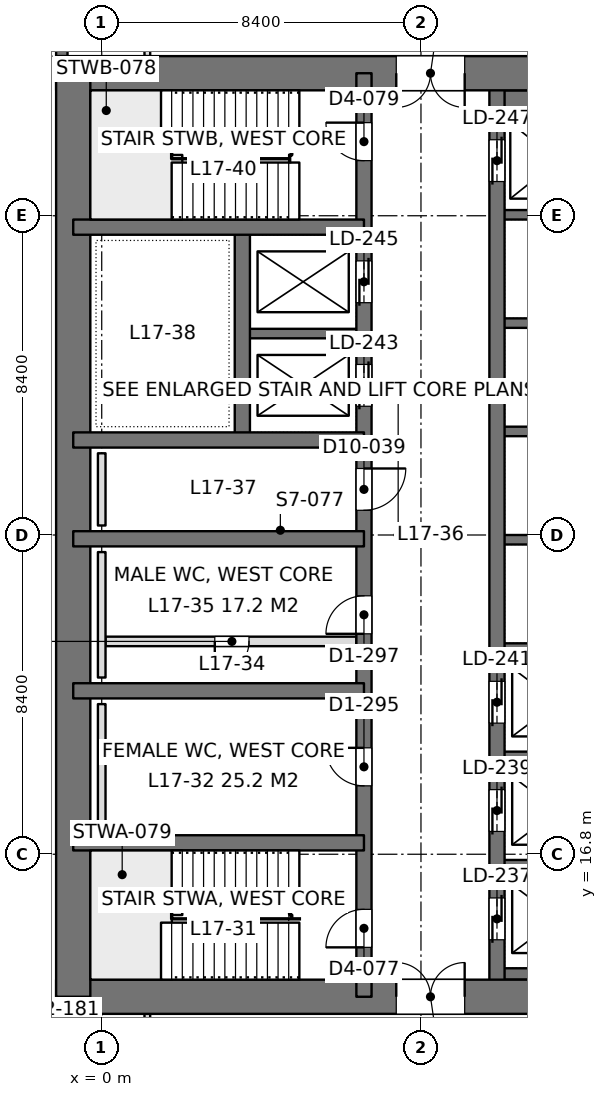
"""IFC4 building model, lengths in metres.
Left out: names, types, materials, properties, quantities, classifications, styles, units other than length and angle.
Written with IfcOpenShell. Run it as: python <this file> out.ifc"""

import sys

from ifc_helpers import new_model, si_unit, direction, frame, frame_2d, origin, place, context, subcontext, project, spatial, rectangle, extrude, element, fill, save


model = new_model("IFC4")
c1 = context("Model", 3, precision=1e-05, world=origin(), true_north=direction((0.0, 1.0)))
c2 = subcontext(c1, "Body", "Model", "MODEL_VIEW")
j1 = project(units=[si_unit("LENGTHUNIT", "METRE"), si_unit("PLANEANGLEUNIT", "RADIAN")], contexts=[c1])
p1 = place(None, origin())
s1 = spatial("IfcSite", under=j1, at=p1, CompositionType="ELEMENT")
p2 = place(p1, origin())
s2 = spatial("IfcBuilding", under=s1, at=p2, CompositionType="ELEMENT")
p3 = place(p2, frame((0.0, 0.0, 77.4)))
s3 = spatial("IfcBuildingStorey", under=s2, at=p3, CompositionType="ELEMENT", Elevation=77.4)
p4 = place(p3, frame((-1.2, 13.05, 0.0), z_axis=(0.0, 0.0, 1.0), x_axis=(1.0, 0.0, 0.0)))
e1 = element("IfcWall", 1, at=p4, inside=s3, PredefinedType="SHEAR", context=c2, shape_type="SweptSolid", body=[
    extrude(rectangle(XDim=18.0, YDim=0.9, at=frame_2d((9.0, 0.0))), origin(), (0.0, 0.0, 1.0), 4.5),
])
p5 = place(p4, frame((8.95, 0.0, 0.0)))
e2 = element("IfcOpeningElement", 2, at=p5, cuts=e1, PredefinedType="OPENING", context=c2, shape_type="SweptSolid", body=[
    extrude(rectangle(XDim=1.8, YDim=2.4, at=frame_2d((0.9, 1.2))), frame((0.0, 0.46, 0.0), z_axis=(0.0, -1.0, 0.0), x_axis=(1.0, 0.0, 0.0)), (0.0, 0.0, 1.0), 0.92),
])
p6 = place(p3, frame((-1.2, 37.35, 0.0), z_axis=(0.0, 0.0, 1.0), x_axis=(1.0, 0.0, 0.0)))
e3 = element("IfcWall", 3, at=p6, inside=s3, PredefinedType="SHEAR", context=c2, shape_type="SweptSolid", body=[
    extrude(rectangle(XDim=18.0, YDim=0.9, at=frame_2d((9.0, 0.0))), origin(), (0.0, 0.0, 1.0), 4.5),
])
p7 = place(p6, frame((8.95, 0.0, 0.0)))
e4 = element("IfcOpeningElement", 4, at=p7, cuts=e3, PredefinedType="OPENING", context=c2, shape_type="SweptSolid", body=[
    extrude(rectangle(XDim=1.8, YDim=2.4, at=frame_2d((0.9, 1.2))), frame((0.0, 0.46, 0.0), z_axis=(0.0, -1.0, 0.0), x_axis=(1.0, 0.0, 0.0)), (0.0, 0.0, 1.0), 0.92),
])
p8 = place(p3, frame((-0.75, 13.05, 0.0), z_axis=(0.0, 0.0, 1.0), x_axis=(0.0, 1.0, 0.0)))
e5 = element("IfcWall", 5, at=p8, inside=s3, PredefinedType="SHEAR", context=c2, shape_type="SweptSolid", body=[
    extrude(rectangle(XDim=24.3, YDim=0.9, at=frame_2d((12.15, 0.0))), origin(), (0.0, 0.0, 1.0), 4.5),
])
p9 = place(p3, frame((6.9, 13.05, 0.0), z_axis=(0.0, 0.0, 1.0), x_axis=(0.0, 1.0, 0.0)))
e6 = element("IfcWall", 6, at=p9, inside=s3, PredefinedType="SHEAR", context=c2, shape_type="SweptSolid", body=[
    extrude(rectangle(XDim=24.3, YDim=0.4, at=frame_2d((12.15, 0.0))), origin(), (0.0, 0.0, 1.0), 4.5),
])
p10 = place(p9, frame((1.3, 0.0, 0.0)))
e7 = element("IfcOpeningElement", 7, at=p10, cuts=e6, PredefinedType="OPENING", context=c2, shape_type="SweptSolid", body=[
    extrude(rectangle(XDim=1.0, YDim=2.2, at=frame_2d((0.5, 1.1))), frame((0.0, 0.21, 0.0), z_axis=(0.0, -1.0, 0.0), x_axis=(1.0, 0.0, 0.0)), (0.0, 0.0, 1.0), 0.42),
])
p11 = place(p9, frame((22.0, 0.0, 0.0)))
e8 = element("IfcOpeningElement", 8, at=p11, cuts=e6, PredefinedType="OPENING", context=c2, shape_type="SweptSolid", body=[
    extrude(rectangle(XDim=1.0, YDim=2.2, at=frame_2d((0.5, 1.1))), frame((0.0, 0.21, 0.0), z_axis=(0.0, -1.0, 0.0), x_axis=(1.0, 0.0, 0.0)), (0.0, 0.0, 1.0), 0.42),
])
p12 = place(p9, frame((5.55, 0.0, 0.0)))
e9 = element("IfcOpeningElement", 9, at=p12, cuts=e6, PredefinedType="OPENING", context=c2, shape_type="SweptSolid", body=[
    extrude(rectangle(XDim=1.0, YDim=2.2, at=frame_2d((0.5, 1.1))), frame((0.0, 0.21, 0.0), z_axis=(0.0, -1.0, 0.0), x_axis=(1.0, 0.0, 0.0)), (0.0, 0.0, 1.0), 0.42),
])
p13 = place(p9, frame((9.55, 0.0, 0.0)))
e10 = element("IfcOpeningElement", 10, at=p13, cuts=e6, PredefinedType="OPENING", context=c2, shape_type="SweptSolid", body=[
    extrude(rectangle(XDim=1.0, YDim=2.2, at=frame_2d((0.5, 1.1))), frame((0.0, 0.21, 0.0), z_axis=(0.0, -1.0, 0.0), x_axis=(1.0, 0.0, 0.0)), (0.0, 0.0, 1.0), 0.42),
])
p14 = place(p9, frame((12.8, 0.0, 0.0)))
e11 = element("IfcOpeningElement", 11, at=p14, cuts=e6, PredefinedType="OPENING", context=c2, shape_type="SweptSolid", body=[
    extrude(rectangle(XDim=1.1, YDim=2.2, at=frame_2d((0.55, 1.1))), frame((0.0, 0.21, 0.0), z_axis=(0.0, -1.0, 0.0), x_axis=(1.0, 0.0, 0.0)), (0.0, 0.0, 1.0), 0.42),
])
p15 = place(p9, frame((15.538, 0.0, 0.0)))
e12 = element("IfcOpeningElement", 12, at=p15, cuts=e6, PredefinedType="OPENING", context=c2, shape_type="SweptSolid", body=[
    extrude(rectangle(XDim=1.1, YDim=2.2, at=frame_2d((0.55, 1.1))), frame((0.0, 0.21, 0.0), z_axis=(0.0, -1.0, 0.0), x_axis=(1.0, 0.0, 0.0)), (0.0, 0.0, 1.0), 0.42),
])
p16 = place(p9, frame((18.262, 0.0, 0.0)))
e13 = element("IfcOpeningElement", 13, at=p16, cuts=e6, PredefinedType="OPENING", context=c2, shape_type="SweptSolid", body=[
    extrude(rectangle(XDim=1.1, YDim=2.2, at=frame_2d((0.55, 1.1))), frame((0.0, 0.21, 0.0), z_axis=(0.0, -1.0, 0.0), x_axis=(1.0, 0.0, 0.0)), (0.0, 0.0, 1.0), 0.42),
])
p17 = place(p3, frame((10.4, 13.05, 0.0), z_axis=(0.0, 0.0, 1.0), x_axis=(0.0, 1.0, 0.0)))
e14 = element("IfcWall", 14, at=p17, inside=s3, PredefinedType="SHEAR", context=c2, shape_type="SweptSolid", body=[
    extrude(rectangle(XDim=24.3, YDim=0.4, at=frame_2d((12.15, 0.0))), origin(), (0.0, 0.0, 1.0), 4.5),
])
p18 = place(p17, frame((1.5, 0.0, 0.0)))
e15 = element("IfcOpeningElement", 15, at=p18, cuts=e14, PredefinedType="OPENING", context=c2, shape_type="SweptSolid", body=[
    extrude(rectangle(XDim=1.1, YDim=2.2, at=frame_2d((0.55, 1.1))), frame((0.0, 0.21, 0.0), z_axis=(0.0, -1.0, 0.0), x_axis=(1.0, 0.0, 0.0)), (0.0, 0.0, 1.0), 0.42),
])
p19 = place(p17, frame((4.35, 0.0, 0.0)))
e16 = element("IfcOpeningElement", 16, at=p19, cuts=e14, PredefinedType="OPENING", context=c2, shape_type="SweptSolid", body=[
    extrude(rectangle(XDim=1.1, YDim=2.2, at=frame_2d((0.55, 1.1))), frame((0.0, 0.21, 0.0), z_axis=(0.0, -1.0, 0.0), x_axis=(1.0, 0.0, 0.0)), (0.0, 0.0, 1.0), 0.42),
])
p20 = place(p17, frame((7.2, 0.0, 0.0)))
e17 = element("IfcOpeningElement", 17, at=p20, cuts=e14, PredefinedType="OPENING", context=c2, shape_type="SweptSolid", body=[
    extrude(rectangle(XDim=1.1, YDim=2.2, at=frame_2d((0.55, 1.1))), frame((0.0, 0.21, 0.0), z_axis=(0.0, -1.0, 0.0), x_axis=(1.0, 0.0, 0.0)), (0.0, 0.0, 1.0), 0.42),
])
p21 = place(p17, frame((21.45, 0.0, 0.0)))
e18 = element("IfcOpeningElement", 18, at=p21, cuts=e14, PredefinedType="OPENING", context=c2, shape_type="SweptSolid", body=[
    extrude(rectangle(XDim=1.1, YDim=2.2, at=frame_2d((0.55, 1.1))), frame((0.0, 0.21, 0.0), z_axis=(0.0, -1.0, 0.0), x_axis=(1.0, 0.0, 0.0)), (0.0, 0.0, 1.0), 0.42),
])
for number, where, z_axis, x_axis in (
    (19, (-0.75, 17.1, 0.0), (0.0, 0.0, 1.0), (1.0, 0.0, 0.0)),
    (20, (-0.75, 21.1, 0.0), (0.0, 0.0, 1.0), (1.0, 0.0, 0.0)),
    (21, (-0.75, 25.1, 0.0), (0.0, 0.0, 1.0), (1.0, 0.0, 0.0)),
    (22, (-0.75, 27.7, 0.0), (0.0, 0.0, 1.0), (1.0, 0.0, 0.0)),
    (23, (-0.75, 33.3, 0.0), (0.0, 0.0, 1.0), (1.0, 0.0, 0.0)),
):
    element("IfcWall", number, at=place(p3, frame(where, z_axis=z_axis, x_axis=x_axis)), inside=s3, PredefinedType="SHEAR", context=c2, shape_type="SweptSolid", body=[
        extrude(rectangle(XDim=7.65, YDim=0.4, at=frame_2d((3.825, 0.0))), origin(), (0.0, 0.0, 1.0), 4.5),
    ])
p22 = place(p3, frame((3.7, 27.7, 0.0), z_axis=(0.0, 0.0, 1.0), x_axis=(0.0, 1.0, 0.0)))
e24 = element("IfcWall", 24, at=p22, inside=s3, PredefinedType="SHEAR", context=c2, shape_type="SweptSolid", body=[
    extrude(rectangle(XDim=5.6, YDim=0.4, at=frame_2d((2.8, 0.0))), origin(), (0.0, 0.0, 1.0), 4.5),
])
p23 = place(p3, frame((3.7, 30.5, 0.0), z_axis=(0.0, 0.0, 1.0), x_axis=(1.0, 0.0, 0.0)))
e25 = element("IfcWall", 25, at=p23, inside=s3, PredefinedType="SHEAR", context=c2, shape_type="SweptSolid", body=[
    extrude(rectangle(XDim=3.2, YDim=0.25, at=frame_2d((1.6, 0.0))), origin(), (0.0, 0.0, 1.0), 4.5),
])
p24 = place(p3, frame((10.4, 13.65, 0.0), z_axis=(0.0, 0.0, 1.0), x_axis=(1.0, 0.0, 0.0)))
e26 = element("IfcWall", 26, at=p24, inside=s3, PredefinedType="SHEAR", context=c2, shape_type="SweptSolid", body=[
    extrude(rectangle(XDim=3.2, YDim=0.3, at=frame_2d((1.6, 0.0))), origin(), (0.0, 0.0, 1.0), 4.5),
])
for number, where, z_axis, x_axis in (
    (27, (10.4, 16.525, 0.0), (0.0, 0.0, 1.0), (1.0, 0.0, 0.0)),
    (28, (10.4, 19.375, 0.0), (0.0, 0.0, 1.0), (1.0, 0.0, 0.0)),
    (29, (10.4, 22.225, 0.0), (0.0, 0.0, 1.0), (1.0, 0.0, 0.0)),
    (30, (10.4, 25.075, 0.0), (0.0, 0.0, 1.0), (1.0, 0.0, 0.0)),
    (31, (10.4, 27.925, 0.0), (0.0, 0.0, 1.0), (1.0, 0.0, 0.0)),
    (32, (10.4, 30.775, 0.0), (0.0, 0.0, 1.0), (1.0, 0.0, 0.0)),
    (33, (10.4, 33.625, 0.0), (0.0, 0.0, 1.0), (1.0, 0.0, 0.0)),
):
    element("IfcWall", number, at=place(p3, frame(where, z_axis=z_axis, x_axis=x_axis)), inside=s3, PredefinedType="SHEAR", context=c2, shape_type="SweptSolid", body=[
        extrude(rectangle(XDim=3.2, YDim=0.25, at=frame_2d((1.6, 0.0))), origin(), (0.0, 0.0, 1.0), 4.5),
    ])
p25 = place(p3, frame((10.4, 36.625, 0.0), z_axis=(0.0, 0.0, 1.0), x_axis=(1.0, 0.0, 0.0)))
e34 = element("IfcWall", 34, at=p25, inside=s3, PredefinedType="SHEAR", context=c2, shape_type="SweptSolid", body=[
    extrude(rectangle(XDim=3.2, YDim=0.55, at=frame_2d((1.6, 0.0))), origin(), (0.0, 0.0, 1.0), 4.5),
])
p26 = place(p3, frame((-1.05, 8.4, 0.0), z_axis=(0.0, 0.0, 1.0), x_axis=(0.0, 1.0, 0.0)))
e35 = element("IfcWall", 35, at=p26, inside=s3, PredefinedType="SOLIDWALL", context=c2, shape_type="SweptSolid", body=[
    extrude(rectangle(XDim=4.2, YDim=0.3, at=frame_2d((2.1, 0.0))), origin(), (0.0, 0.0, 1.0), 4.34),
])
p27 = place(p26, frame((0.9, 0.0, 0.9)))
e36 = element("IfcOpeningElement", 36, at=p27, cuts=e35, PredefinedType="OPENING", context=c2, shape_type="SweptSolid", body=[
    extrude(rectangle(XDim=2.4, YDim=1.9, at=frame_2d((1.2, 0.95))), frame((0.0, 0.16, 0.0), z_axis=(0.0, -1.0, 0.0), x_axis=(1.0, 0.0, 0.0)), (0.0, 0.0, 1.0), 0.32),
])
p28 = place(p3, frame((-1.05, 37.8, 0.0), z_axis=(0.0, 0.0, 1.0), x_axis=(0.0, 1.0, 0.0)))
e37 = element("IfcWall", 37, at=p28, inside=s3, PredefinedType="SOLIDWALL", context=c2, shape_type="SweptSolid", body=[
    extrude(rectangle(XDim=4.2, YDim=0.3, at=frame_2d((2.1, 0.0))), origin(), (0.0, 0.0, 1.0), 4.34),
])
p29 = place(p28, frame((0.9, 0.0, 0.9)))
e38 = element("IfcOpeningElement", 38, at=p29, cuts=e37, PredefinedType="OPENING", context=c2, shape_type="SweptSolid", body=[
    extrude(rectangle(XDim=2.4, YDim=1.9, at=frame_2d((1.2, 0.95))), frame((0.0, 0.16, 0.0), z_axis=(0.0, -1.0, 0.0), x_axis=(1.0, 0.0, 0.0)), (0.0, 0.0, 1.0), 0.32),
])
p30 = place(p3, frame((1.2, 10.8, 0.0), z_axis=(0.0, 0.0, 1.0), x_axis=(0.0, 1.0, 0.0)))
e39 = element("IfcWall", 39, at=p30, inside=s3, PredefinedType="PARTITIONING", context=c2, shape_type="SweptSolid", body=[
    extrude(rectangle(XDim=1.802, YDim=0.15, at=frame_2d((0.901, 0.0))), origin(), (0.0, 0.0, 1.0), 4.34),
])
p31 = place(p3, frame((1.2, 37.8, 0.0), z_axis=(0.0, 0.0, 1.0), x_axis=(0.0, 1.0, 0.0)))
e40 = element("IfcWall", 40, at=p31, inside=s3, PredefinedType="PARTITIONING", context=c2, shape_type="SweptSolid", body=[
    extrude(rectangle(XDim=1.8, YDim=0.15, at=frame_2d((0.9, 0.0))), origin(), (0.0, 0.0, 1.0), 4.34),
])
p32 = place(p3, frame((0.1, 22.4, 0.0), z_axis=(0.0, 0.0, 1.0), x_axis=(1.0, 0.0, 0.0)))
e41 = element("IfcWall", 41, at=p32, inside=s3, PredefinedType="PARTITIONING", context=c2, shape_type="SweptSolid", body=[
    extrude(rectangle(XDim=6.6, YDim=0.25, at=frame_2d((3.3, 0.0))), origin(), (0.0, 0.0, 1.0), 4.3),
])
p33 = place(p32, frame((2.875, 0.0, 0.0)))
e42 = element("IfcOpeningElement", 42, at=p33, cuts=e41, PredefinedType="OPENING", context=c2, shape_type="SweptSolid", body=[
    extrude(rectangle(XDim=0.9, YDim=2.2, at=frame_2d((0.45, 1.1))), frame((0.0, 0.135, 0.0), z_axis=(0.0, -1.0, 0.0), x_axis=(1.0, 0.0, 0.0)), (0.0, 0.0, 1.0), 0.27),
])
for number, where, z_axis, x_axis in (
    (43, (0.0, 17.45, 0.0), (0.0, 0.0, 1.0), (0.0, 1.0, 0.0)),
    (44, (0.0, 21.45, 0.0), (0.0, 0.0, 1.0), (0.0, 1.0, 0.0)),
):
    element("IfcWall", number, at=place(p3, frame(where, z_axis=z_axis, x_axis=x_axis)), inside=s3, PredefinedType="PLUMBINGWALL", context=c2, shape_type="SweptSolid", body=[
        extrude(rectangle(XDim=3.3, YDim=0.2, at=frame_2d((1.65, 0.0))), origin(), (0.0, 0.0, 1.0), 1.2),
    ])
p34 = place(p3, frame((0.0, 25.45, 0.0), z_axis=(0.0, 0.0, 1.0), x_axis=(0.0, 1.0, 0.0)))
e45 = element("IfcWall", 45, at=p34, inside=s3, PredefinedType="PLUMBINGWALL", context=c2, shape_type="SweptSolid", body=[
    extrude(rectangle(XDim=1.9, YDim=0.2, at=frame_2d((0.95, 0.0))), origin(), (0.0, 0.0, 1.0), 1.2),
])
p35 = place(p5, origin())
e46 = element("IfcDoor", 46, at=p35, inside=s3, OperationType="DOUBLE_DOOR_SINGLE_SWING", PredefinedType="DOOR", context=c2, shape_type="SweptSolid", body=[
    extrude(rectangle(XDim=1.8, YDim=2.4, at=frame_2d((0.9, 1.2))), frame((0.0, 0.025, 0.0), z_axis=(0.0, -1.0, 0.0), x_axis=(1.0, 0.0, 0.0)), (0.0, 0.0, 1.0), 0.05),
])
fill(e2, e46)
p36 = place(p7, frame((1.8, 0.0, 0.0), z_axis=(0.0, 0.0, 1.0), x_axis=(-1.0, 0.0, 0.0)))
e47 = element("IfcDoor", 47, at=p36, inside=s3, OperationType="DOUBLE_DOOR_SINGLE_SWING", PredefinedType="DOOR", context=c2, shape_type="SweptSolid", body=[
    extrude(rectangle(XDim=1.8, YDim=2.4, at=frame_2d((0.9, 1.2))), frame((0.0, 0.025, 0.0), z_axis=(0.0, -1.0, 0.0), x_axis=(1.0, 0.0, 0.0)), (0.0, 0.0, 1.0), 0.05),
])
fill(e4, e47)
p37 = place(p10, origin())
e48 = element("IfcDoor", 48, at=p37, inside=s3, OperationType="SINGLE_SWING_LEFT", PredefinedType="DOOR", context=c2, shape_type="SweptSolid", body=[
    extrude(rectangle(XDim=1.0, YDim=2.2, at=frame_2d((0.5, 1.1))), frame((0.0, 0.025, 0.0), z_axis=(0.0, -1.0, 0.0), x_axis=(1.0, 0.0, 0.0)), (0.0, 0.0, 1.0), 0.05),
])
fill(e7, e48)
p38 = place(p11, origin())
e49 = element("IfcDoor", 49, at=p38, inside=s3, OperationType="SINGLE_SWING_RIGHT", PredefinedType="DOOR", context=c2, shape_type="SweptSolid", body=[
    extrude(rectangle(XDim=1.0, YDim=2.2, at=frame_2d((0.5, 1.1))), frame((0.0, 0.025, 0.0), z_axis=(0.0, -1.0, 0.0), x_axis=(1.0, 0.0, 0.0)), (0.0, 0.0, 1.0), 0.05),
])
fill(e8, e49)
p39 = place(p12, origin())
e50 = element("IfcDoor", 50, at=p39, inside=s3, OperationType="SINGLE_SWING_RIGHT", PredefinedType="DOOR", context=c2, shape_type="SweptSolid", body=[
    extrude(rectangle(XDim=1.0, YDim=2.2, at=frame_2d((0.5, 1.1))), frame((0.0, 0.025, 0.0), z_axis=(0.0, -1.0, 0.0), x_axis=(1.0, 0.0, 0.0)), (0.0, 0.0, 1.0), 0.05),
])
fill(e9, e50)
p40 = place(p13, origin())
e51 = element("IfcDoor", 51, at=p40, inside=s3, OperationType="SINGLE_SWING_LEFT", PredefinedType="DOOR", context=c2, shape_type="SweptSolid", body=[
    extrude(rectangle(XDim=1.0, YDim=2.2, at=frame_2d((0.5, 1.1))), frame((0.0, 0.025, 0.0), z_axis=(0.0, -1.0, 0.0), x_axis=(1.0, 0.0, 0.0)), (0.0, 0.0, 1.0), 0.05),
])
fill(e10, e51)
p41 = place(p14, frame((1.1, 0.0, 0.0), z_axis=(0.0, 0.0, 1.0), x_axis=(-1.0, 0.0, 0.0)))
e52 = element("IfcDoor", 52, at=p41, inside=s3, OperationType="SINGLE_SWING_LEFT", PredefinedType="DOOR", context=c2, shape_type="SweptSolid", body=[
    extrude(rectangle(XDim=1.1, YDim=2.2, at=frame_2d((0.55, 1.1))), frame((0.0, 0.025, 0.0), z_axis=(0.0, -1.0, 0.0), x_axis=(1.0, 0.0, 0.0)), (0.0, 0.0, 1.0), 0.05),
])
fill(e11, e52)
p42 = place(p18, origin())
e53 = element("IfcDoor", 53, at=p42, inside=s3, OperationType="DOUBLE_DOOR_SLIDING", PredefinedType="DOOR", context=c2, shape_type="SweptSolid", body=[
    extrude(rectangle(XDim=1.1, YDim=2.2, at=frame_2d((0.55, 1.1))), frame((0.0, 0.025, 0.0), z_axis=(0.0, -1.0, 0.0), x_axis=(1.0, 0.0, 0.0)), (0.0, 0.0, 1.0), 0.05),
])
fill(e15, e53)
p43 = place(p19, origin())
e54 = element("IfcDoor", 54, at=p43, inside=s3, OperationType="DOUBLE_DOOR_SLIDING", PredefinedType="DOOR", context=c2, shape_type="SweptSolid", body=[
    extrude(rectangle(XDim=1.1, YDim=2.2, at=frame_2d((0.55, 1.1))), frame((0.0, 0.025, 0.0), z_axis=(0.0, -1.0, 0.0), x_axis=(1.0, 0.0, 0.0)), (0.0, 0.0, 1.0), 0.05),
])
fill(e16, e54)
p44 = place(p20, origin())
e55 = element("IfcDoor", 55, at=p44, inside=s3, OperationType="DOUBLE_DOOR_SLIDING", PredefinedType="DOOR", context=c2, shape_type="SweptSolid", body=[
    extrude(rectangle(XDim=1.1, YDim=2.2, at=frame_2d((0.55, 1.1))), frame((0.0, 0.025, 0.0), z_axis=(0.0, -1.0, 0.0), x_axis=(1.0, 0.0, 0.0)), (0.0, 0.0, 1.0), 0.05),
])
fill(e17, e55)
p45 = place(p21, origin())
e56 = element("IfcDoor", 56, at=p45, inside=s3, OperationType="DOUBLE_DOOR_SLIDING", PredefinedType="DOOR", context=c2, shape_type="SweptSolid", body=[
    extrude(rectangle(XDim=1.1, YDim=2.2, at=frame_2d((0.55, 1.1))), frame((0.0, 0.025, 0.0), z_axis=(0.0, -1.0, 0.0), x_axis=(1.0, 0.0, 0.0)), (0.0, 0.0, 1.0), 0.05),
])
fill(e18, e56)
p46 = place(p15, origin())
e57 = element("IfcDoor", 57, at=p46, inside=s3, OperationType="DOUBLE_DOOR_SLIDING", PredefinedType="DOOR", context=c2, shape_type="SweptSolid", body=[
    extrude(rectangle(XDim=1.1, YDim=2.2, at=frame_2d((0.55, 1.1))), frame((0.0, 0.025, 0.0), z_axis=(0.0, -1.0, 0.0), x_axis=(1.0, 0.0, 0.0)), (0.0, 0.0, 1.0), 0.05),
])
fill(e12, e57)
p47 = place(p16, origin())
e58 = element("IfcDoor", 58, at=p47, inside=s3, OperationType="DOUBLE_DOOR_SLIDING", PredefinedType="DOOR", context=c2, shape_type="SweptSolid", body=[
    extrude(rectangle(XDim=1.1, YDim=2.2, at=frame_2d((0.55, 1.1))), frame((0.0, 0.025, 0.0), z_axis=(0.0, -1.0, 0.0), x_axis=(1.0, 0.0, 0.0)), (0.0, 0.0, 1.0), 0.05),
])
fill(e13, e58)
p48 = place(p33, frame((0.9, 0.0, 0.0), z_axis=(0.0, 0.0, 1.0), x_axis=(-1.0, 0.0, 0.0)))
e59 = element("IfcDoor", 59, at=p48, inside=s3, OperationType="SINGLE_SWING_RIGHT", PredefinedType="DOOR", context=c2, shape_type="SweptSolid", body=[
    extrude(rectangle(XDim=0.9, YDim=2.2, at=frame_2d((0.45, 1.1))), frame((0.0, 0.025, 0.0), z_axis=(0.0, -1.0, 0.0), x_axis=(1.0, 0.0, 0.0)), (0.0, 0.0, 1.0), 0.05),
])
fill(e42, e59)
save(model, sys.argv[1])
